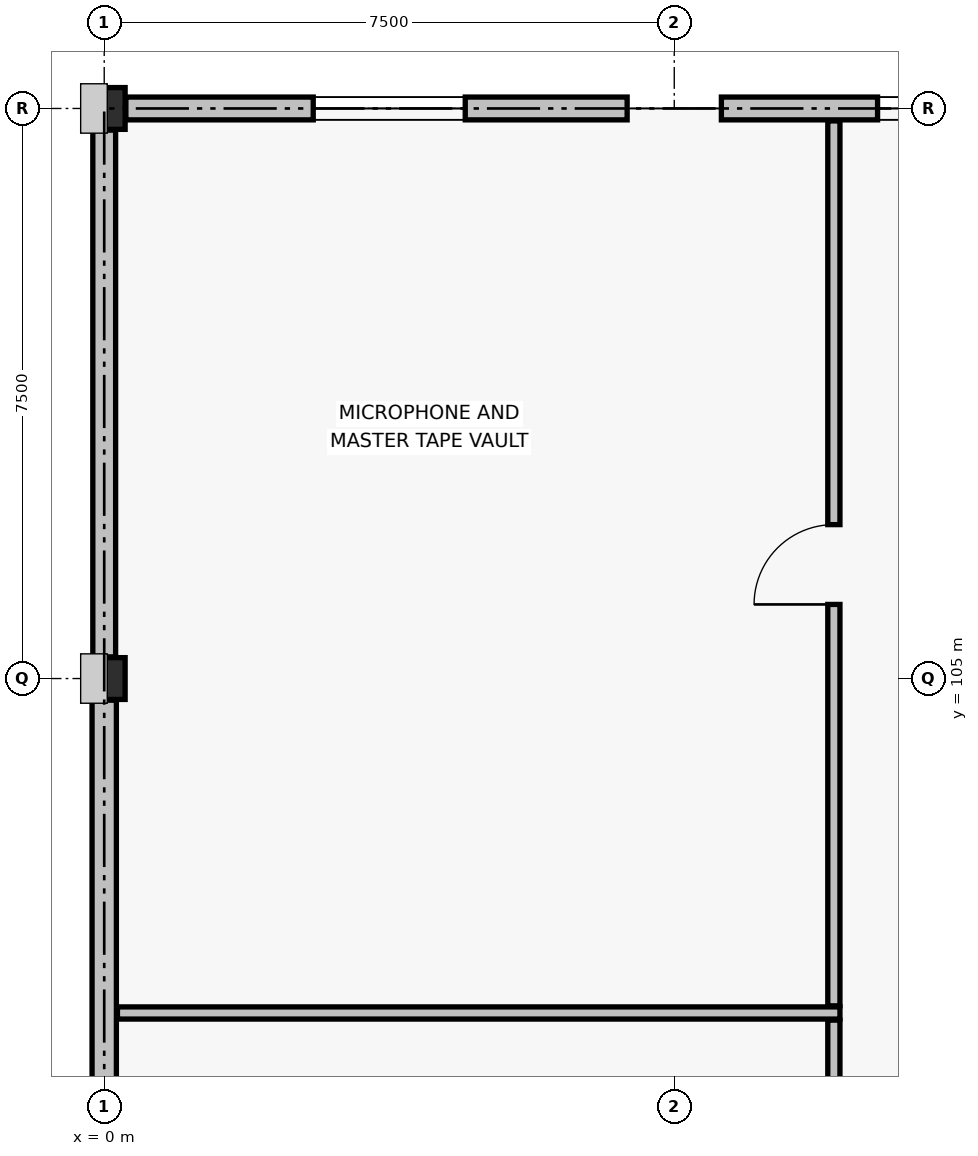
"""IFC4 building model, lengths in metres.
Left out: names, types, materials, properties, quantities, classifications, styles, units other than length and angle.
Written with IfcOpenShell. Run it as: python <this file> out.ifc"""

import sys

from ifc_helpers import new_model, si_unit, direction, frame, frame_2d, origin, origin_2d, place, context, subcontext, project, spatial, rectangle, extrude, element, fill, save


model = new_model("IFC4")
c1 = context("Model", 3, precision=1e-05, world=origin(), true_north=direction((0.0, 1.0)))
c2 = subcontext(c1, "Body", "Model", "MODEL_VIEW")
j1 = project(units=[si_unit("LENGTHUNIT", "METRE"), si_unit("PLANEANGLEUNIT", "RADIAN")], contexts=[c1])
p1 = place(None, origin())
s1 = spatial("IfcSite", under=j1, at=p1, CompositionType="ELEMENT")
p2 = place(p1, origin())
s2 = spatial("IfcBuilding", under=s1, at=p2, CompositionType="ELEMENT")
p3 = place(p2, frame((0.0, 0.0, 13.2)))
s3 = spatial("IfcBuildingStorey", under=s2, at=p3, CompositionType="ELEMENT", Elevation=13.2)
for number, where, z_axis, x_axis in (
    (1, (0.0, 105.0, 0.0), (0.0, 0.0, 1.0), (1.0, 0.0, 0.0)),
    (2, (0.0, 112.5, 0.0), (0.0, 0.0, 1.0), (1.0, 0.0, 0.0)),
):
    element("IfcColumn", number, at=place(p3, frame(where, z_axis=z_axis, x_axis=x_axis)), inside=s3, PredefinedType="COLUMN", context=c2, shape_type="SweptSolid", body=[
        extrude(rectangle(XDim=0.55, YDim=0.55, at=origin_2d()), origin(), (0.0, 0.0, 1.0), 3.9),
    ])
p4 = place(p3, frame((0.285, 112.5, 0.0), z_axis=(0.0, 0.0, 1.0), x_axis=(1.0, 0.0, 0.0)))
e3 = element("IfcWall", 3, at=p4, inside=s3, PredefinedType="SOLIDWALL", context=c2, shape_type="SweptSolid", body=[
    extrude(rectangle(XDim=6.595, YDim=0.3, at=frame_2d((3.297, 0.0))), origin(), (0.0, 0.0, 1.0), 2.59),
])
p5 = place(p4, frame((2.465, 0.0, 0.6)))
e4 = element("IfcOpeningElement", 4, at=p5, cuts=e3, PredefinedType="OPENING", context=c2, shape_type="SweptSolid", body=[
    extrude(rectangle(XDim=2.0, YDim=1.45, at=frame_2d((1.0, 0.725))), frame((0.0, 0.16, 0.0), z_axis=(0.0, -1.0, 0.0), x_axis=(1.0, 0.0, 0.0)), (0.0, 0.0, 1.0), 0.32),
])
p6 = place(p3, frame((8.12, 112.5, 0.0), z_axis=(0.0, 0.0, 1.0), x_axis=(1.0, 0.0, 0.0)))
e5 = element("IfcWall", 5, at=p6, inside=s3, PredefinedType="SOLIDWALL", context=c2, shape_type="SweptSolid", body=[
    extrude(rectangle(XDim=6.595, YDim=0.3, at=frame_2d((3.297, 0.0))), origin(), (0.0, 0.0, 1.0), 2.59),
])
p7 = place(p6, frame((2.055, 0.0, 0.6)))
e6 = element("IfcOpeningElement", 6, at=p7, cuts=e5, PredefinedType="OPENING", context=c2, shape_type="SweptSolid", body=[
    extrude(rectangle(XDim=2.15, YDim=1.45, at=frame_2d((1.075, 0.725))), frame((0.0, 0.16, 0.0), z_axis=(0.0, -1.0, 0.0), x_axis=(1.0, 0.0, 0.0)), (0.0, 0.0, 1.0), 0.32),
])
p8 = place(p3, frame((0.0, 97.785, 0.0), z_axis=(0.0, 0.0, 1.0), x_axis=(0.0, 1.0, 0.0)))
e7 = element("IfcWall", 7, at=p8, inside=s3, PredefinedType="SOLIDWALL", context=c2, shape_type="SweptSolid", body=[
    extrude(rectangle(XDim=6.93, YDim=0.32, at=frame_2d((3.465, 0.0))), origin(), (0.0, 0.0, 1.0), 2.59),
])
p9 = place(p3, frame((0.0, 105.285, 0.0), z_axis=(0.0, 0.0, 1.0), x_axis=(0.0, 1.0, 0.0)))
e8 = element("IfcWall", 8, at=p9, inside=s3, PredefinedType="SOLIDWALL", context=c2, shape_type="SweptSolid", body=[
    extrude(rectangle(XDim=6.93, YDim=0.3, at=frame_2d((3.465, 0.0))), origin(), (0.0, 0.0, 1.0), 2.59),
])
p10 = place(p3, frame((0.174, 100.6, 0.0), z_axis=(0.0, 0.0, 1.0), x_axis=(1.0, 0.0, 0.0)))
e9 = element("IfcWall", 9, at=p10, inside=s3, PredefinedType="PARTITIONING", context=c2, shape_type="SweptSolid", body=[
    extrude(rectangle(XDim=9.506, YDim=0.16, at=frame_2d((4.753, 0.0))), origin(), (0.0, 0.0, 1.0), 2.97),
])
p11 = place(p3, frame((9.6, 97.594, 0.0), z_axis=(0.0, 0.0, 1.0), x_axis=(0.0, 1.0, 0.0)))
e10 = element("IfcWall", 10, at=p11, inside=s3, PredefinedType="PARTITIONING", context=c2, shape_type="SweptSolid", body=[
    extrude(rectangle(XDim=2.912, YDim=0.16, at=frame_2d((1.456, 0.0))), origin(), (0.0, 0.0, 1.0), 2.59),
])
p12 = place(p11, frame((0.981, 0.0, 0.0)))
e11 = element("IfcOpeningElement", 11, at=p12, cuts=e10, PredefinedType="OPENING", context=c2, shape_type="SweptSolid", body=[
    extrude(rectangle(XDim=0.95, YDim=2.1, at=frame_2d((0.475, 1.05))), frame((0.0, 0.09, 0.0), z_axis=(0.0, -1.0, 0.0), x_axis=(1.0, 0.0, 0.0)), (0.0, 0.0, 1.0), 0.18),
])
p13 = place(p3, frame((9.6, 100.694, 0.0), z_axis=(0.0, 0.0, 1.0), x_axis=(0.0, 1.0, 0.0)))
e12 = element("IfcWall", 12, at=p13, inside=s3, PredefinedType="PARTITIONING", context=c2, shape_type="SweptSolid", body=[
    extrude(rectangle(XDim=11.642, YDim=0.16, at=frame_2d((5.821, 0.0))), origin(), (0.0, 0.0, 1.0), 2.59),
])
p14 = place(p13, frame((5.281, 0.0, 0.0)))
e13 = element("IfcOpeningElement", 13, at=p14, cuts=e12, PredefinedType="OPENING", context=c2, shape_type="SweptSolid", body=[
    extrude(rectangle(XDim=1.05, YDim=2.12, at=frame_2d((0.525, 1.06))), frame((0.0, 0.09, 0.0), z_axis=(0.0, -1.0, 0.0), x_axis=(1.0, 0.0, 0.0)), (0.0, 0.0, 1.0), 0.18),
])
p15 = place(p5, origin())
e14 = element("IfcWindow", 14, at=p15, inside=s3, PartitioningType="SINGLE_PANEL", PredefinedType="WINDOW", context=c2, shape_type="SweptSolid", body=[
    extrude(rectangle(XDim=2.0, YDim=1.45, at=frame_2d((1.0, 0.725))), frame((0.0, 0.03, 0.0), z_axis=(0.0, -1.0, 0.0), x_axis=(1.0, 0.0, 0.0)), (0.0, 0.0, 1.0), 0.06),
])
fill(e4, e14)
p16 = place(p7, origin())
e15 = element("IfcWindow", 15, at=p16, inside=s3, PartitioningType="SINGLE_PANEL", PredefinedType="WINDOW", context=c2, shape_type="SweptSolid", body=[
    extrude(rectangle(XDim=2.15, YDim=1.45, at=frame_2d((1.075, 0.725))), frame((0.0, 0.03, 0.0), z_axis=(0.0, -1.0, 0.0), x_axis=(1.0, 0.0, 0.0)), (0.0, 0.0, 1.0), 0.06),
])
fill(e6, e15)
p17 = place(p14, origin())
e16 = element("IfcDoor", 16, at=p17, inside=s3, OperationType="SINGLE_SWING_LEFT", PredefinedType="DOOR", context=c2, shape_type="SweptSolid", body=[
    extrude(rectangle(XDim=1.05, YDim=2.12, at=frame_2d((0.525, 1.06))), frame((0.0, 0.025, 0.0), z_axis=(0.0, -1.0, 0.0), x_axis=(1.0, 0.0, 0.0)), (0.0, 0.0, 1.0), 0.05),
])
fill(e13, e16)
save(model, sys.argv[1])
